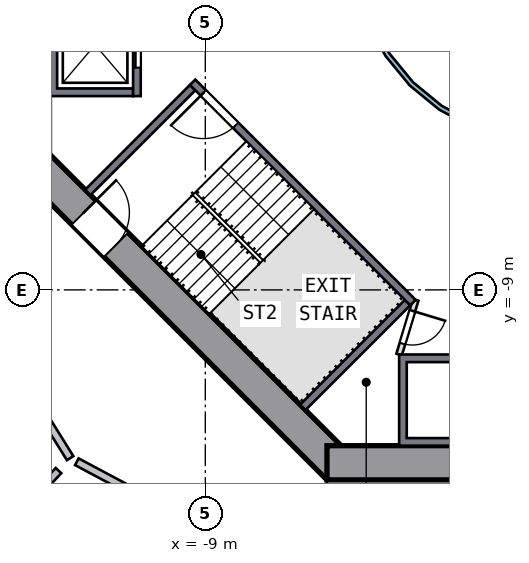
"""IFC4 building model, lengths in metres.
Left out: names, types, materials, properties, quantities, classifications, styles, units other than length and angle.
Written with IfcOpenShell. Run it as: python <this file> out.ifc"""

import sys

from ifc_helpers import new_model, si_unit, direction, frame, frame_2d, origin, place, context, subcontext, project, spatial, polyline, rectangle, outline, extrude, element, fill, save


model = new_model("IFC4")
c1 = context("Model", 3, precision=1e-05, world=origin(), true_north=direction((0.0, 1.0)))
c2 = subcontext(c1, "Body", "Model", "MODEL_VIEW")
j1 = project(units=[si_unit("LENGTHUNIT", "METRE"), si_unit("PLANEANGLEUNIT", "RADIAN")], contexts=[c1])
p1 = place(None, origin())
s1 = spatial("IfcSite", under=j1, at=p1, CompositionType="ELEMENT")
p2 = place(p1, origin())
s2 = spatial("IfcBuilding", under=s1, at=p2, CompositionType="ELEMENT")
p3 = place(p2, frame((0.0, 0.0, 42.5)))
s3 = spatial("IfcBuildingStorey", under=s2, at=p3, CompositionType="ELEMENT", Elevation=42.5)
p4 = place(p3, frame((-13.682, -5.481, 0.0), z_axis=(0.0, 0.0, 1.0), x_axis=(0.707106781, -0.707106781, 0.0)))
e1 = element("IfcWall", 1, at=p4, inside=s3, PredefinedType="SHEAR", context=c2, shape_type="SweptSolid", body=[
    extrude(rectangle(XDim=11.598, YDim=0.9, at=frame_2d((5.799, 0.0))), origin(), (0.0, 0.0, 1.0), 3.5),
])
p5 = place(p4, frame((2.099, 0.0, 0.0)))
e2 = element("IfcOpeningElement", 2, at=p5, cuts=e1, PredefinedType="OPENING", context=c2, shape_type="SweptSolid", body=[
    extrude(rectangle(XDim=1.2, YDim=2.1, at=frame_2d((0.6, 1.05))), frame((0.0, 0.46, 0.0), z_axis=(0.0, -1.0, 0.0), x_axis=(1.0, 0.0, 0.0)), (0.0, 0.0, 1.0), 0.92),
])
p6 = place(p3, frame((-5.799, -13.55, 0.0), z_axis=(0.0, 0.0, 1.0), x_axis=(1.0, 0.0, 0.0)))
e3 = element("IfcWall", 3, at=p6, inside=s3, PredefinedType="SHEAR", context=c2, shape_type="SweptSolid", body=[
    extrude(rectangle(XDim=11.598, YDim=0.9, at=frame_2d((5.799, 0.0))), origin(), (0.0, 0.0, 1.0), 3.5),
])
p7 = place(p6, frame((4.899, 0.0, 0.0)))
e4 = element("IfcOpeningElement", 4, at=p7, cuts=e3, PredefinedType="OPENING", context=c2, shape_type="SweptSolid", body=[
    extrude(rectangle(XDim=1.8, YDim=2.1, at=frame_2d((0.9, 1.05))), frame((0.0, 0.46, 0.0), z_axis=(0.0, -1.0, 0.0), x_axis=(1.0, 0.0, 0.0)), (0.0, 0.0, 1.0), 0.92),
])
p8 = place(p3, origin())
e5 = element("IfcWall", 5, at=p8, inside=s3, PredefinedType="SOLIDWALL", context=c2, shape_type="SweptSolid", body=[
    extrude(outline(polyline([(-13.1, -3.9), (-13.1, -1.2), (-10.9, -1.2), (-10.9, -1.4), (-12.9, -1.4), (-12.9, -3.7), (-10.9, -3.7), (-10.9, -3.9), (-13.1, -3.9)])), origin(), (0.0, 0.0, 1.0), 3.19),
])
p9 = place(p3, frame((-10.8, -1.2, 0.0), z_axis=(0.0, 0.0, 1.0), x_axis=(0.0, -1.0, 0.0)))
e6 = element("IfcWall", 6, at=p9, inside=s3, PredefinedType="SOLIDWALL", context=c2, shape_type="SweptSolid", body=[
    extrude(rectangle(XDim=2.7, YDim=0.2, at=frame_2d((1.35, 0.0))), origin(), (0.0, 0.0, 1.0), 3.19),
])
p10 = place(p9, frame((0.75, 0.0, 0.0)))
e7 = element("IfcOpeningElement", 7, at=p10, cuts=e6, PredefinedType="OPENING", context=c2, shape_type="SweptSolid", body=[
    extrude(rectangle(XDim=1.2, YDim=2.1, at=frame_2d((0.6, 1.05))), frame((0.0, 0.11, 0.0), z_axis=(0.0, -1.0, 0.0), x_axis=(1.0, 0.0, 0.0)), (0.0, 0.0, 1.0), 0.22),
])
p11 = place(p3, origin())
e8 = element("IfcWall", 8, at=p11, inside=s3, PredefinedType="SOLIDWALL", context=c2, shape_type="SweptSolid", body=[
    extrude(outline(polyline([(-1.2, -13.1), (-3.9, -13.1), (-3.9, -10.7), (-1.2, -10.7), (-1.2, -13.1)]), holes=[polyline([(-3.7, -10.9), (-3.7, -12.9), (-1.4, -12.9), (-1.4, -10.9), (-3.7, -10.9)])]), origin(), (0.0, 0.0, 1.0), 3.19),
])
p12 = place(p3, frame((-3.535, -9.334, 0.0), z_axis=(0.0, 0.0, 1.0), x_axis=(-0.707106781, 0.707106781, 0.0)))
e9 = element("IfcWall", 9, at=p12, inside=s3, PredefinedType="SOLIDWALL", context=c2, shape_type="SweptSolid", body=[
    extrude(rectangle(XDim=8.2, YDim=0.2, at=frame_2d((4.1, 0.0))), origin(), (0.0, 0.0, 1.0), 3.19),
])
p13 = place(p12, frame((6.6, 0.0, 0.0)))
e10 = element("IfcOpeningElement", 10, at=p13, cuts=e9, PredefinedType="OPENING", context=c2, shape_type="SweptSolid", body=[
    extrude(rectangle(XDim=1.2, YDim=2.1, at=frame_2d((0.6, 1.05))), frame((0.0, 0.11, 0.0), z_axis=(0.0, -1.0, 0.0), x_axis=(1.0, 0.0, 0.0)), (0.0, 0.0, 1.0), 0.22),
])
for number, where, z_axis, x_axis in (
    (11, (-9.334, -3.677, 0.0), (0.0, 0.0, 1.0), (-0.707, -0.707, 0.0)),
    (12, (-3.677, -9.334, 0.0), (0.0, 0.0, 1.0), (-0.707, -0.707, 0.0)),
):
    element("IfcWall", number, at=place(p3, frame(where, z_axis=z_axis, x_axis=x_axis)), inside=s3, PredefinedType="SOLIDWALL", context=c2, shape_type="SweptSolid", body=[
        extrude(rectangle(XDim=3.9, YDim=0.2, at=frame_2d((1.95, 0.0))), origin(), (0.0, 0.0, 1.0), 3.19),
    ])
p14 = place(p3, frame((-3.465, -9.263, 0.0), z_axis=(0.0, 0.0, 1.0), x_axis=(-0.289808785, -0.957084567, 0.0)))
e13 = element("IfcWall", 13, at=p14, inside=s3, PredefinedType="PARTITIONING", context=c2, shape_type="SweptSolid", body=[
    extrude(rectangle(XDim=1.501, YDim=0.15, at=frame_2d((0.75, 0.0))), origin(), (0.0, 0.0, 1.0), 3.19),
])
p15 = place(p14, frame((0.301, 0.0, 0.0)))
e14 = element("IfcOpeningElement", 14, at=p15, cuts=e13, PredefinedType="OPENING", context=c2, shape_type="SweptSolid", body=[
    extrude(rectangle(XDim=0.9, YDim=2.1, at=frame_2d((0.45, 1.05))), frame((0.0, 0.085, 0.0), z_axis=(0.0, -1.0, 0.0), x_axis=(1.0, 0.0, 0.0)), (0.0, 0.0, 1.0), 0.17),
])
p16 = place(p3, origin())
e15 = element("IfcWall", 15, at=p16, inside=s3, PredefinedType="SOLIDWALL", context=c2, shape_type="SweptSolid", body=[
    extrude(outline(polyline([(5.021, -0.999), (4.73, -1.959), (4.257, -2.844), (3.62, -3.62), (2.844, -4.257), (1.959, -4.73), (0.999, -5.021), (0.0, -5.12), (-0.999, -5.021), (-1.959, -4.73), (-2.844, -4.257), (-3.62, -3.62), (-4.257, -2.844), (-4.73, -1.959), (-5.021, -0.999), (-5.12, 0.0), (-5.021, 0.999), (-4.73, 1.959), (-4.257, 2.844), (-3.62, 3.62), (-2.844, 4.257), (-1.959, 4.73), (-0.999, 5.021), (0.0, 5.12), (0.999, 5.021), (1.959, 4.73), (2.844, 4.257), (3.62, 3.62), (4.257, 2.844), (4.73, 1.959), (5.021, 0.999), (5.12, 0.0), (5.021, -0.999)]), holes=[polyline([(4.904, 0.976), (4.619, 1.913), (4.157, 2.778), (3.535, 3.535), (2.778, 4.157), (1.913, 4.619), (0.976, 4.904), (0.0, 5.0), (-0.976, 4.904), (-1.913, 4.619), (-2.778, 4.157), (-3.535, 3.535), (-4.157, 2.778), (-4.619, 1.913), (-4.904, 0.976), (-5.0, 0.0), (-4.904, -0.976), (-4.619, -1.913), (-4.157, -2.778), (-3.535, -3.535), (-2.778, -4.157), (-1.913, -4.619), (-0.976, -4.904), (0.0, -5.0), (0.976, -4.904), (1.913, -4.619), (2.778, -4.157), (3.535, -3.535), (4.157, -2.778), (4.619, -1.913), (4.904, -0.976), (5.0, 0.0), (4.904, 0.976)])]), origin(), (0.0, 0.0, 1.0), 3.19),
])
p17 = place(p3, frame((-14.386, -10.493, 0.0), z_axis=(0.0, 0.0, 1.0), x_axis=(0.52876097, -0.84877078, 0.0)))
e16 = element("IfcWall", 16, at=p17, inside=s3, PredefinedType="SOLIDWALL", context=c2, shape_type="SweptSolid", body=[
    extrude(rectangle(XDim=3.458, YDim=0.2, at=frame_2d((1.729, 0.0))), origin(), (0.0, 0.0, 1.0), 3.19),
])
p18 = place(p3, frame((-4.161, -17.907, 0.0), z_axis=(0.0, 0.0, 1.0), x_axis=(-0.882295625, 0.470695688, 0.0)))
e17 = element("IfcWall", 17, at=p18, inside=s3, PredefinedType="SOLIDWALL", context=c2, shape_type="SweptSolid", body=[
    extrude(rectangle(XDim=9.316, YDim=0.2, at=frame_2d((4.658, 0.0))), origin(), (0.0, 0.0, 1.0), 3.19),
])
p19 = place(p18, frame((5.15, 0.0, 0.0)))
e18 = element("IfcOpeningElement", 18, at=p19, cuts=e17, PredefinedType="OPENING", context=c2, shape_type="SweptSolid", body=[
    extrude(rectangle(XDim=1.0, YDim=2.1, at=frame_2d((0.5, 1.05))), frame((0.0, 0.11, 0.0), z_axis=(0.0, -1.0, 0.0), x_axis=(1.0, 0.0, 0.0)), (0.0, 0.0, 1.0), 0.22),
])
p20 = place(p3, frame((-12.863, -13.755, 0.0), z_axis=(0.0, 0.0, 1.0), x_axis=(-0.683008227, -0.730410681, 0.0)))
e19 = element("IfcWall", 19, at=p20, inside=s3, PredefinedType="SOLIDWALL", context=c2, shape_type="SweptSolid", body=[
    extrude(rectangle(XDim=3.075, YDim=0.2, at=frame_2d((1.537, 0.0))), origin(), (0.0, 0.0, 1.0), 3.19),
])
p21 = place(p10, origin())
e20 = element("IfcDoor", 20, at=p21, inside=s3, OperationType="DOUBLE_DOOR_SLIDING", PredefinedType="DOOR", context=c2, shape_type="SweptSolid", body=[
    extrude(rectangle(XDim=1.2, YDim=2.1, at=frame_2d((0.6, 1.05))), frame((0.0, 0.025, 0.0), z_axis=(0.0, -1.0, 0.0), x_axis=(1.0, 0.0, 0.0)), (0.0, 0.0, 1.0), 0.05),
])
fill(e7, e20)
p22 = place(p13, origin())
e21 = element("IfcDoor", 21, at=p22, inside=s3, OperationType="SINGLE_SWING_RIGHT", PredefinedType="DOOR", context=c2, shape_type="SweptSolid", body=[
    extrude(rectangle(XDim=1.2, YDim=2.1, at=frame_2d((0.6, 1.05))), frame((0.0, 0.025, 0.0), z_axis=(0.0, -1.0, 0.0), x_axis=(1.0, 0.0, 0.0)), (0.0, 0.0, 1.0), 0.05),
])
fill(e10, e21)
p23 = place(p5, origin())
e22 = element("IfcDoor", 22, at=p23, inside=s3, OperationType="SINGLE_SWING_LEFT", PredefinedType="DOOR", context=c2, shape_type="SweptSolid", body=[
    extrude(rectangle(XDim=1.2, YDim=2.1, at=frame_2d((0.6, 1.05))), frame((0.0, 0.025, 0.0), z_axis=(0.0, -1.0, 0.0), x_axis=(1.0, 0.0, 0.0)), (0.0, 0.0, 1.0), 0.05),
])
fill(e2, e22)
p24 = place(p15, origin())
e23 = element("IfcDoor", 23, at=p24, inside=s3, OperationType="SINGLE_SWING_LEFT", PredefinedType="DOOR", context=c2, shape_type="SweptSolid", body=[
    extrude(rectangle(XDim=0.9, YDim=2.1, at=frame_2d((0.45, 1.05))), frame((0.0, 0.025, 0.0), z_axis=(0.0, -1.0, 0.0), x_axis=(1.0, 0.0, 0.0)), (0.0, 0.0, 1.0), 0.05),
])
fill(e14, e23)
save(model, sys.argv[1])
